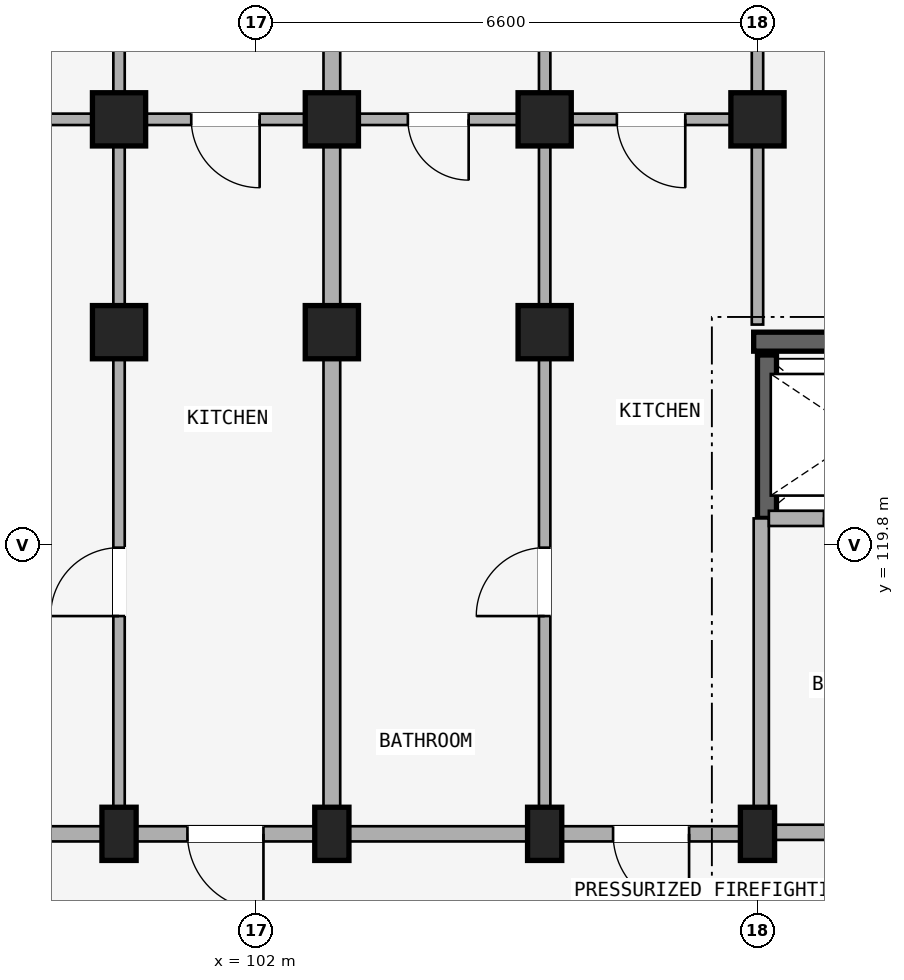
"""IFC4 building model, lengths in metres.
Left out: names, types, materials, properties, quantities, classifications, styles, units other than length and angle.
Written with IfcOpenShell. Run it as: python <this file> out.ifc"""

import sys

from ifc_helpers import new_model, si_unit, direction, frame, frame_2d, origin, origin_2d, place, context, subcontext, project, spatial, rectangle, extrude, element, fill, save


model = new_model("IFC4")
c1 = context("Model", 3, precision=1e-05, world=origin(), true_north=direction((0.0, 1.0)))
c2 = subcontext(c1, "Body", "Model", "MODEL_VIEW")
j1 = project(units=[si_unit("LENGTHUNIT", "METRE"), si_unit("PLANEANGLEUNIT", "RADIAN")], contexts=[c1])
p1 = place(None, origin())
s1 = spatial("IfcSite", under=j1, at=p1, CompositionType="ELEMENT")
p2 = place(p1, origin())
s2 = spatial("IfcBuilding", under=s1, at=p2, CompositionType="ELEMENT")
p3 = place(p2, frame((0.0, 0.0, 24.45)))
s3 = spatial("IfcBuildingStorey", under=s2, at=p3, CompositionType="ELEMENT", Elevation=24.45)
p4 = place(p3, frame((111.35, 122.475, 0.0), z_axis=(0.0, 0.0, 1.0), x_axis=(-1.0, 0.0, 0.0)))
e1 = element("IfcWall", 1, at=p4, inside=s3, PredefinedType="SHEAR", context=c2, shape_type="SweptSolid", body=[
    extrude(rectangle(XDim=2.8, YDim=0.25, at=frame_2d((1.4, 0.0))), origin(), (0.0, 0.0, 1.0), 2.93),
])
p5 = place(p3, frame((108.725, 120.15, 0.0), z_axis=(0.0, 0.0, 1.0), x_axis=(0.0, 1.0, 0.0)))
e2 = element("IfcWall", 2, at=p5, inside=s3, PredefinedType="SHEAR", context=c2, shape_type="SweptSolid", body=[
    extrude(rectangle(XDim=2.15, YDim=0.25, at=frame_2d((1.075, 0.0))), origin(), (0.0, 0.0, 1.0), 2.93),
])
p6 = place(p3, frame((108.6, 116.0, 0.0), z_axis=(0.0, 0.0, 1.0), x_axis=(1.0, 0.0, 0.0)))
e3 = element("IfcColumn", 3, at=p6, inside=s3, PredefinedType="COLUMN", context=c2, shape_type="SweptSolid", body=[
    extrude(rectangle(XDim=0.45, YDim=0.7, at=origin_2d()), origin(), (0.0, 0.0, 1.0), 2.93),
])
p7 = place(p3, frame((108.6, 125.4, 0.0), z_axis=(0.0, 0.0, 1.0), x_axis=(1.0, 0.0, 0.0)))
e4 = element("IfcColumn", 4, at=p7, inside=s3, PredefinedType="COLUMN", context=c2, shape_type="SweptSolid", body=[
    extrude(rectangle(XDim=0.7, YDim=0.7, at=origin_2d()), origin(), (0.0, 0.0, 1.0), 2.93),
])
p8 = place(p3, frame((105.8, 116.0, 0.0), z_axis=(0.0, 0.0, 1.0), x_axis=(1.0, 0.0, 0.0)))
e5 = element("IfcColumn", 5, at=p8, inside=s3, PredefinedType="COLUMN", context=c2, shape_type="SweptSolid", body=[
    extrude(rectangle(XDim=0.45, YDim=0.7, at=origin_2d()), origin(), (0.0, 0.0, 1.0), 2.93),
])
for number, where, z_axis, x_axis in (
    (6, (105.8, 122.6, 0.0), (0.0, 0.0, 1.0), (1.0, 0.0, 0.0)),
    (7, (105.8, 125.4, 0.0), (0.0, 0.0, 1.0), (1.0, 0.0, 0.0)),
):
    element("IfcColumn", number, at=place(p3, frame(where, z_axis=z_axis, x_axis=x_axis)), inside=s3, PredefinedType="COLUMN", context=c2, shape_type="SweptSolid", body=[
        extrude(rectangle(XDim=0.7, YDim=0.7, at=origin_2d()), origin(), (0.0, 0.0, 1.0), 2.93),
    ])
p9 = place(p3, frame((103.0, 116.0, 0.0), z_axis=(0.0, 0.0, 1.0), x_axis=(1.0, 0.0, 0.0)))
e8 = element("IfcColumn", 8, at=p9, inside=s3, PredefinedType="COLUMN", context=c2, shape_type="SweptSolid", body=[
    extrude(rectangle(XDim=0.45, YDim=0.7, at=origin_2d()), origin(), (0.0, 0.0, 1.0), 2.93),
])
for number, where, z_axis, x_axis in (
    (9, (103.0, 122.6, 0.0), (0.0, 0.0, 1.0), (1.0, 0.0, 0.0)),
    (10, (103.0, 125.4, 0.0), (0.0, 0.0, 1.0), (1.0, 0.0, 0.0)),
):
    element("IfcColumn", number, at=place(p3, frame(where, z_axis=z_axis, x_axis=x_axis)), inside=s3, PredefinedType="COLUMN", context=c2, shape_type="SweptSolid", body=[
        extrude(rectangle(XDim=0.7, YDim=0.7, at=origin_2d()), origin(), (0.0, 0.0, 1.0), 2.93),
    ])
p10 = place(p3, frame((100.2, 116.0, 0.0), z_axis=(0.0, 0.0, 1.0), x_axis=(1.0, 0.0, 0.0)))
e11 = element("IfcColumn", 11, at=p10, inside=s3, PredefinedType="COLUMN", context=c2, shape_type="SweptSolid", body=[
    extrude(rectangle(XDim=0.45, YDim=0.7, at=origin_2d()), origin(), (0.0, 0.0, 1.0), 2.93),
])
for number, where, z_axis, x_axis in (
    (12, (100.2, 122.6, 0.0), (0.0, 0.0, 1.0), (1.0, 0.0, 0.0)),
    (13, (100.2, 125.4, 0.0), (0.0, 0.0, 1.0), (1.0, 0.0, 0.0)),
):
    element("IfcColumn", number, at=place(p3, frame(where, z_axis=z_axis, x_axis=x_axis)), inside=s3, PredefinedType="COLUMN", context=c2, shape_type="SweptSolid", body=[
        extrude(rectangle(XDim=0.7, YDim=0.7, at=origin_2d()), origin(), (0.0, 0.0, 1.0), 2.93),
    ])
p11 = place(p3, frame((114.3, 116.02, 0.0), z_axis=(0.0, 0.0, 1.0), x_axis=(-1.0, 0.0, 0.0)))
e14 = element("IfcWall", 14, at=p11, inside=s3, PredefinedType="STANDARD", context=c2, shape_type="SweptSolid", body=[
    extrude(rectangle(XDim=5.65, YDim=0.2, at=frame_2d((2.825, 0.0))), origin(), (0.0, 0.0, 1.0), 2.372),
])
p12 = place(p11, frame((1.923, 0.0, 0.0)))
e15 = element("IfcOpeningElement", 15, at=p12, cuts=e14, PredefinedType="OPENING", context=c2, shape_type="SweptSolid", body=[
    extrude(rectangle(XDim=1.24, YDim=2.15, at=frame_2d((0.62, 1.075))), frame((0.0, 0.11, 0.0), z_axis=(0.0, -1.0, 0.0), x_axis=(1.0, 0.0, 0.0)), (0.0, 0.0, 1.0), 0.22),
])
p13 = place(p3, frame((108.65, 116.02, 0.0), z_axis=(0.0, 0.0, 1.0), x_axis=(0.0, 1.0, 0.0)))
e16 = element("IfcWall", 16, at=p13, inside=s3, PredefinedType="STANDARD", context=c2, shape_type="SweptSolid", body=[
    extrude(rectangle(XDim=4.13, YDim=0.2, at=frame_2d((2.065, 0.0))), origin(), (0.0, 0.0, 1.0), 2.372),
])
p14 = place(p3, frame((111.3, 120.15, 0.0), z_axis=(0.0, 0.0, 1.0), x_axis=(-1.0, 0.0, 0.0)))
e17 = element("IfcWall", 17, at=p14, inside=s3, PredefinedType="STANDARD", context=c2, shape_type="SweptSolid", body=[
    extrude(rectangle(XDim=2.55, YDim=0.2, at=frame_2d((1.275, 0.0))), origin(), (0.0, 0.0, 1.0), 2.372),
])
p15 = place(p14, frame((0.725, 0.0, 0.0)))
e18 = element("IfcOpeningElement", 18, at=p15, cuts=e17, PredefinedType="OPENING", context=c2, shape_type="SweptSolid", body=[
    extrude(rectangle(XDim=1.1, YDim=2.15, at=frame_2d((0.55, 1.075))), frame((0.0, 0.11, 0.0), z_axis=(0.0, -1.0, 0.0), x_axis=(1.0, 0.0, 0.0)), (0.0, 0.0, 1.0), 0.22),
])
p16 = place(p3, frame((108.6, 116.0, 0.0), z_axis=(0.0, 0.0, 1.0), x_axis=(-1.0, 0.0, 0.0)))
e19 = element("IfcWall", 19, at=p16, inside=s3, PredefinedType="STANDARD", context=c2, shape_type="SweptSolid", body=[
    extrude(rectangle(XDim=2.8, YDim=0.2, at=frame_2d((1.4, 0.0))), origin(), (0.0, 0.0, 1.0), 2.372),
])
p17 = place(p16, frame((0.9, 0.0, 0.0)))
e20 = element("IfcOpeningElement", 20, at=p17, cuts=e19, PredefinedType="OPENING", context=c2, shape_type="SweptSolid", body=[
    extrude(rectangle(XDim=1.0, YDim=2.15, at=frame_2d((0.5, 1.075))), frame((0.0, 0.11, 0.0), z_axis=(0.0, -1.0, 0.0), x_axis=(1.0, 0.0, 0.0)), (0.0, 0.0, 1.0), 0.22),
])
p18 = place(p3, frame((108.52, 125.4, 0.0), z_axis=(0.0, 0.0, 1.0), x_axis=(-1.0, 0.0, 0.0)))
e21 = element("IfcWall", 21, at=p18, inside=s3, PredefinedType="PLUMBINGWALL", context=c2, shape_type="SweptSolid", body=[
    extrude(rectangle(XDim=2.64, YDim=0.15, at=frame_2d((1.32, 0.0))), origin(), (0.0, 0.0, 1.0), 2.372),
])
p19 = place(p18, frame((0.87, 0.0, 0.0)))
e22 = element("IfcOpeningElement", 22, at=p19, cuts=e21, PredefinedType="OPENING", context=c2, shape_type="SweptSolid", body=[
    extrude(rectangle(XDim=0.9, YDim=2.1, at=frame_2d((0.45, 1.05))), frame((0.0, 0.085, 0.0), z_axis=(0.0, -1.0, 0.0), x_axis=(1.0, 0.0, 0.0)), (0.0, 0.0, 1.0), 0.17),
])
p20 = place(p3, frame((105.8, 116.0, 0.0), z_axis=(0.0, 0.0, 1.0), x_axis=(-1.0, 0.0, 0.0)))
e23 = element("IfcWall", 23, at=p20, inside=s3, PredefinedType="STANDARD", context=c2, shape_type="SweptSolid", body=[
    extrude(rectangle(XDim=2.8, YDim=0.2, at=frame_2d((1.4, 0.0))), origin(), (0.0, 0.0, 1.0), 2.372),
])
p21 = place(p3, frame((105.72, 125.4, 0.0), z_axis=(0.0, 0.0, 1.0), x_axis=(-1.0, 0.0, 0.0)))
e24 = element("IfcWall", 24, at=p21, inside=s3, PredefinedType="PLUMBINGWALL", context=c2, shape_type="SweptSolid", body=[
    extrude(rectangle(XDim=2.64, YDim=0.15, at=frame_2d((1.32, 0.0))), origin(), (0.0, 0.0, 1.0), 2.372),
])
p22 = place(p21, frame((0.92, 0.0, 0.0)))
e25 = element("IfcOpeningElement", 25, at=p22, cuts=e24, PredefinedType="OPENING", context=c2, shape_type="SweptSolid", body=[
    extrude(rectangle(XDim=0.8, YDim=2.1, at=frame_2d((0.4, 1.05))), frame((0.0, 0.085, 0.0), z_axis=(0.0, -1.0, 0.0), x_axis=(1.0, 0.0, 0.0)), (0.0, 0.0, 1.0), 0.17),
])
p23 = place(p3, frame((103.0, 116.0, 0.0), z_axis=(0.0, 0.0, 1.0), x_axis=(-1.0, 0.0, 0.0)))
e26 = element("IfcWall", 26, at=p23, inside=s3, PredefinedType="STANDARD", context=c2, shape_type="SweptSolid", body=[
    extrude(rectangle(XDim=2.8, YDim=0.2, at=frame_2d((1.4, 0.0))), origin(), (0.0, 0.0, 1.0), 2.372),
])
p24 = place(p23, frame((0.9, 0.0, 0.0)))
e27 = element("IfcOpeningElement", 27, at=p24, cuts=e26, PredefinedType="OPENING", context=c2, shape_type="SweptSolid", body=[
    extrude(rectangle(XDim=1.0, YDim=2.15, at=frame_2d((0.5, 1.075))), frame((0.0, 0.11, 0.0), z_axis=(0.0, -1.0, 0.0), x_axis=(1.0, 0.0, 0.0)), (0.0, 0.0, 1.0), 0.22),
])
p25 = place(p3, frame((102.92, 125.4, 0.0), z_axis=(0.0, 0.0, 1.0), x_axis=(-1.0, 0.0, 0.0)))
e28 = element("IfcWall", 28, at=p25, inside=s3, PredefinedType="PLUMBINGWALL", context=c2, shape_type="SweptSolid", body=[
    extrude(rectangle(XDim=2.64, YDim=0.15, at=frame_2d((1.32, 0.0))), origin(), (0.0, 0.0, 1.0), 2.372),
])
p26 = place(p25, frame((0.87, 0.0, 0.0)))
e29 = element("IfcOpeningElement", 29, at=p26, cuts=e28, PredefinedType="OPENING", context=c2, shape_type="SweptSolid", body=[
    extrude(rectangle(XDim=0.9, YDim=2.1, at=frame_2d((0.45, 1.05))), frame((0.0, 0.085, 0.0), z_axis=(0.0, -1.0, 0.0), x_axis=(1.0, 0.0, 0.0)), (0.0, 0.0, 1.0), 0.17),
])
p27 = place(p3, frame((100.2, 116.0, 0.0), z_axis=(0.0, 0.0, 1.0), x_axis=(-1.0, 0.0, 0.0)))
e30 = element("IfcWall", 30, at=p27, inside=s3, PredefinedType="STANDARD", context=c2, shape_type="SweptSolid", body=[
    extrude(rectangle(XDim=2.8, YDim=0.2, at=frame_2d((1.4, 0.0))), origin(), (0.0, 0.0, 1.0), 2.372),
])
p28 = place(p3, frame((100.12, 125.4, 0.0), z_axis=(0.0, 0.0, 1.0), x_axis=(-1.0, 0.0, 0.0)))
e31 = element("IfcWall", 31, at=p28, inside=s3, PredefinedType="PLUMBINGWALL", context=c2, shape_type="SweptSolid", body=[
    extrude(rectangle(XDim=2.64, YDim=0.15, at=frame_2d((1.32, 0.0))), origin(), (0.0, 0.0, 1.0), 2.372),
])
p29 = place(p28, frame((0.92, 0.0, 0.0)))
e32 = element("IfcOpeningElement", 32, at=p29, cuts=e31, PredefinedType="OPENING", context=c2, shape_type="SweptSolid", body=[
    extrude(rectangle(XDim=0.8, YDim=2.1, at=frame_2d((0.4, 1.05))), frame((0.0, 0.085, 0.0), z_axis=(0.0, -1.0, 0.0), x_axis=(1.0, 0.0, 0.0)), (0.0, 0.0, 1.0), 0.17),
])
p30 = place(p3, frame((108.6, 122.7, 0.0), z_axis=(0.0, 0.0, 1.0), x_axis=(0.0, 1.0, 0.0)))
e33 = element("IfcWall", 33, at=p30, inside=s3, PredefinedType="PARTITIONING", context=c2, shape_type="SweptSolid", body=[
    extrude(rectangle(XDim=10.82, YDim=0.15, at=frame_2d((5.41, 0.0))), origin(), (0.0, 0.0, 1.0), 2.372),
])
p31 = place(p30, frame((3.7, 0.0, 0.0)))
e34 = element("IfcOpeningElement", 34, at=p31, cuts=e33, PredefinedType="OPENING", context=c2, shape_type="SweptSolid", body=[
    extrude(rectangle(XDim=0.8, YDim=2.1, at=frame_2d((0.4, 1.05))), frame((0.0, 0.085, 0.0), z_axis=(0.0, -1.0, 0.0), x_axis=(1.0, 0.0, 0.0)), (0.0, 0.0, 1.0), 0.17),
])
p32 = place(p3, frame((105.8, 116.05, 0.0), z_axis=(0.0, 0.0, 1.0), x_axis=(0.0, 1.0, 0.0)))
e35 = element("IfcWall", 35, at=p32, inside=s3, PredefinedType="PARTITIONING", context=c2, shape_type="SweptSolid", body=[
    extrude(rectangle(XDim=6.53, YDim=0.15, at=frame_2d((3.265, 0.0))), origin(), (0.0, 0.0, 1.0), 2.372),
])
p33 = place(p32, frame((2.815, 0.0, 0.0)))
e36 = element("IfcOpeningElement", 36, at=p33, cuts=e35, PredefinedType="OPENING", context=c2, shape_type="SweptSolid", body=[
    extrude(rectangle(XDim=0.9, YDim=2.1, at=frame_2d((0.45, 1.05))), frame((0.0, 0.085, 0.0), z_axis=(0.0, -1.0, 0.0), x_axis=(1.0, 0.0, 0.0)), (0.0, 0.0, 1.0), 0.17),
])
p34 = place(p3, frame((105.8, 122.7, 0.0), z_axis=(0.0, 0.0, 1.0), x_axis=(0.0, 1.0, 0.0)))
e37 = element("IfcWall", 37, at=p34, inside=s3, PredefinedType="PARTITIONING", context=c2, shape_type="SweptSolid", body=[
    extrude(rectangle(XDim=10.82, YDim=0.15, at=frame_2d((5.41, 0.0))), origin(), (0.0, 0.0, 1.0), 2.372),
])
p35 = place(p34, frame((3.7, 0.0, 0.0)))
e38 = element("IfcOpeningElement", 38, at=p35, cuts=e37, PredefinedType="OPENING", context=c2, shape_type="SweptSolid", body=[
    extrude(rectangle(XDim=0.8, YDim=2.1, at=frame_2d((0.4, 1.05))), frame((0.0, 0.085, 0.0), z_axis=(0.0, -1.0, 0.0), x_axis=(1.0, 0.0, 0.0)), (0.0, 0.0, 1.0), 0.17),
])
p36 = place(p3, frame((103.0, 116.05, 0.0), z_axis=(0.0, 0.0, 1.0), x_axis=(0.0, 1.0, 0.0)))
e39 = element("IfcWall", 39, at=p36, inside=s3, PredefinedType="STANDARD", context=c2, shape_type="SweptSolid", body=[
    extrude(rectangle(XDim=6.53, YDim=0.22, at=frame_2d((3.265, 0.0))), origin(), (0.0, 0.0, 1.0), 2.372),
])
p37 = place(p3, frame((103.0, 122.7, 0.0), z_axis=(0.0, 0.0, 1.0), x_axis=(0.0, 1.0, 0.0)))
e40 = element("IfcWall", 40, at=p37, inside=s3, PredefinedType="STANDARD", context=c2, shape_type="SweptSolid", body=[
    extrude(rectangle(XDim=10.82, YDim=0.22, at=frame_2d((5.41, 0.0))), origin(), (0.0, 0.0, 1.0), 2.372),
])
p38 = place(p3, frame((100.2, 116.05, 0.0), z_axis=(0.0, 0.0, 1.0), x_axis=(0.0, 1.0, 0.0)))
e41 = element("IfcWall", 41, at=p38, inside=s3, PredefinedType="PARTITIONING", context=c2, shape_type="SweptSolid", body=[
    extrude(rectangle(XDim=6.53, YDim=0.15, at=frame_2d((3.265, 0.0))), origin(), (0.0, 0.0, 1.0), 2.372),
])
p39 = place(p38, frame((2.815, 0.0, 0.0)))
e42 = element("IfcOpeningElement", 42, at=p39, cuts=e41, PredefinedType="OPENING", context=c2, shape_type="SweptSolid", body=[
    extrude(rectangle(XDim=0.9, YDim=2.1, at=frame_2d((0.45, 1.05))), frame((0.0, 0.085, 0.0), z_axis=(0.0, -1.0, 0.0), x_axis=(1.0, 0.0, 0.0)), (0.0, 0.0, 1.0), 0.17),
])
p40 = place(p3, frame((100.2, 122.7, 0.0), z_axis=(0.0, 0.0, 1.0), x_axis=(0.0, 1.0, 0.0)))
e43 = element("IfcWall", 43, at=p40, inside=s3, PredefinedType="PARTITIONING", context=c2, shape_type="SweptSolid", body=[
    extrude(rectangle(XDim=10.82, YDim=0.15, at=frame_2d((5.41, 0.0))), origin(), (0.0, 0.0, 1.0), 2.372),
])
p41 = place(p40, frame((3.7, 0.0, 0.0)))
e44 = element("IfcOpeningElement", 44, at=p41, cuts=e43, PredefinedType="OPENING", context=c2, shape_type="SweptSolid", body=[
    extrude(rectangle(XDim=0.8, YDim=2.1, at=frame_2d((0.4, 1.05))), frame((0.0, 0.085, 0.0), z_axis=(0.0, -1.0, 0.0), x_axis=(1.0, 0.0, 0.0)), (0.0, 0.0, 1.0), 0.17),
])
p42 = place(p15, origin())
e45 = element("IfcDoor", 45, at=p42, inside=s3, OperationType="SLIDING_TO_LEFT", PredefinedType="DOOR", context=c2, shape_type="SweptSolid", body=[
    extrude(rectangle(XDim=1.1, YDim=2.15, at=frame_2d((0.55, 1.075))), frame((0.0, 0.025, 0.0), z_axis=(0.0, -1.0, 0.0), x_axis=(1.0, 0.0, 0.0)), (0.0, 0.0, 1.0), 0.05),
])
fill(e18, e45)
p43 = place(p19, origin())
e46 = element("IfcDoor", 46, at=p43, inside=s3, OperationType="SINGLE_SWING_LEFT", PredefinedType="DOOR", context=c2, shape_type="SweptSolid", body=[
    extrude(rectangle(XDim=0.9, YDim=2.1, at=frame_2d((0.45, 1.05))), frame((0.0, 0.025, 0.0), z_axis=(0.0, -1.0, 0.0), x_axis=(1.0, 0.0, 0.0)), (0.0, 0.0, 1.0), 0.05),
])
fill(e22, e46)
p44 = place(p17, frame((1.0, 0.0, 0.0), z_axis=(0.0, 0.0, 1.0), x_axis=(-1.0, 0.0, 0.0)))
e47 = element("IfcDoor", 47, at=p44, inside=s3, OperationType="SINGLE_SWING_RIGHT", PredefinedType="DOOR", context=c2, shape_type="SweptSolid", body=[
    extrude(rectangle(XDim=1.0, YDim=2.15, at=frame_2d((0.5, 1.075))), frame((0.0, 0.025, 0.0), z_axis=(0.0, -1.0, 0.0), x_axis=(1.0, 0.0, 0.0)), (0.0, 0.0, 1.0), 0.05),
])
fill(e20, e47)
p45 = place(p22, origin())
e48 = element("IfcDoor", 48, at=p45, inside=s3, OperationType="SINGLE_SWING_LEFT", PredefinedType="DOOR", context=c2, shape_type="SweptSolid", body=[
    extrude(rectangle(XDim=0.8, YDim=2.1, at=frame_2d((0.4, 1.05))), frame((0.0, 0.025, 0.0), z_axis=(0.0, -1.0, 0.0), x_axis=(1.0, 0.0, 0.0)), (0.0, 0.0, 1.0), 0.05),
])
fill(e25, e48)
p46 = place(p26, origin())
e49 = element("IfcDoor", 49, at=p46, inside=s3, OperationType="SINGLE_SWING_LEFT", PredefinedType="DOOR", context=c2, shape_type="SweptSolid", body=[
    extrude(rectangle(XDim=0.9, YDim=2.1, at=frame_2d((0.45, 1.05))), frame((0.0, 0.025, 0.0), z_axis=(0.0, -1.0, 0.0), x_axis=(1.0, 0.0, 0.0)), (0.0, 0.0, 1.0), 0.05),
])
fill(e29, e49)
p47 = place(p24, frame((1.0, 0.0, 0.0), z_axis=(0.0, 0.0, 1.0), x_axis=(-1.0, 0.0, 0.0)))
e50 = element("IfcDoor", 50, at=p47, inside=s3, OperationType="SINGLE_SWING_RIGHT", PredefinedType="DOOR", context=c2, shape_type="SweptSolid", body=[
    extrude(rectangle(XDim=1.0, YDim=2.15, at=frame_2d((0.5, 1.075))), frame((0.0, 0.025, 0.0), z_axis=(0.0, -1.0, 0.0), x_axis=(1.0, 0.0, 0.0)), (0.0, 0.0, 1.0), 0.05),
])
fill(e27, e50)
p48 = place(p33, frame((0.9, 0.0, 0.0), z_axis=(0.0, 0.0, 1.0), x_axis=(-1.0, 0.0, 0.0)))
e51 = element("IfcDoor", 51, at=p48, inside=s3, OperationType="SINGLE_SWING_RIGHT", PredefinedType="DOOR", context=c2, shape_type="SweptSolid", body=[
    extrude(rectangle(XDim=0.9, YDim=2.1, at=frame_2d((0.45, 1.05))), frame((0.0, 0.025, 0.0), z_axis=(0.0, -1.0, 0.0), x_axis=(1.0, 0.0, 0.0)), (0.0, 0.0, 1.0), 0.05),
])
fill(e36, e51)
p49 = place(p39, origin())
e52 = element("IfcDoor", 52, at=p49, inside=s3, OperationType="SINGLE_SWING_LEFT", PredefinedType="DOOR", context=c2, shape_type="SweptSolid", body=[
    extrude(rectangle(XDim=0.9, YDim=2.1, at=frame_2d((0.45, 1.05))), frame((0.0, 0.025, 0.0), z_axis=(0.0, -1.0, 0.0), x_axis=(1.0, 0.0, 0.0)), (0.0, 0.0, 1.0), 0.05),
])
fill(e42, e52)
save(model, sys.argv[1])
